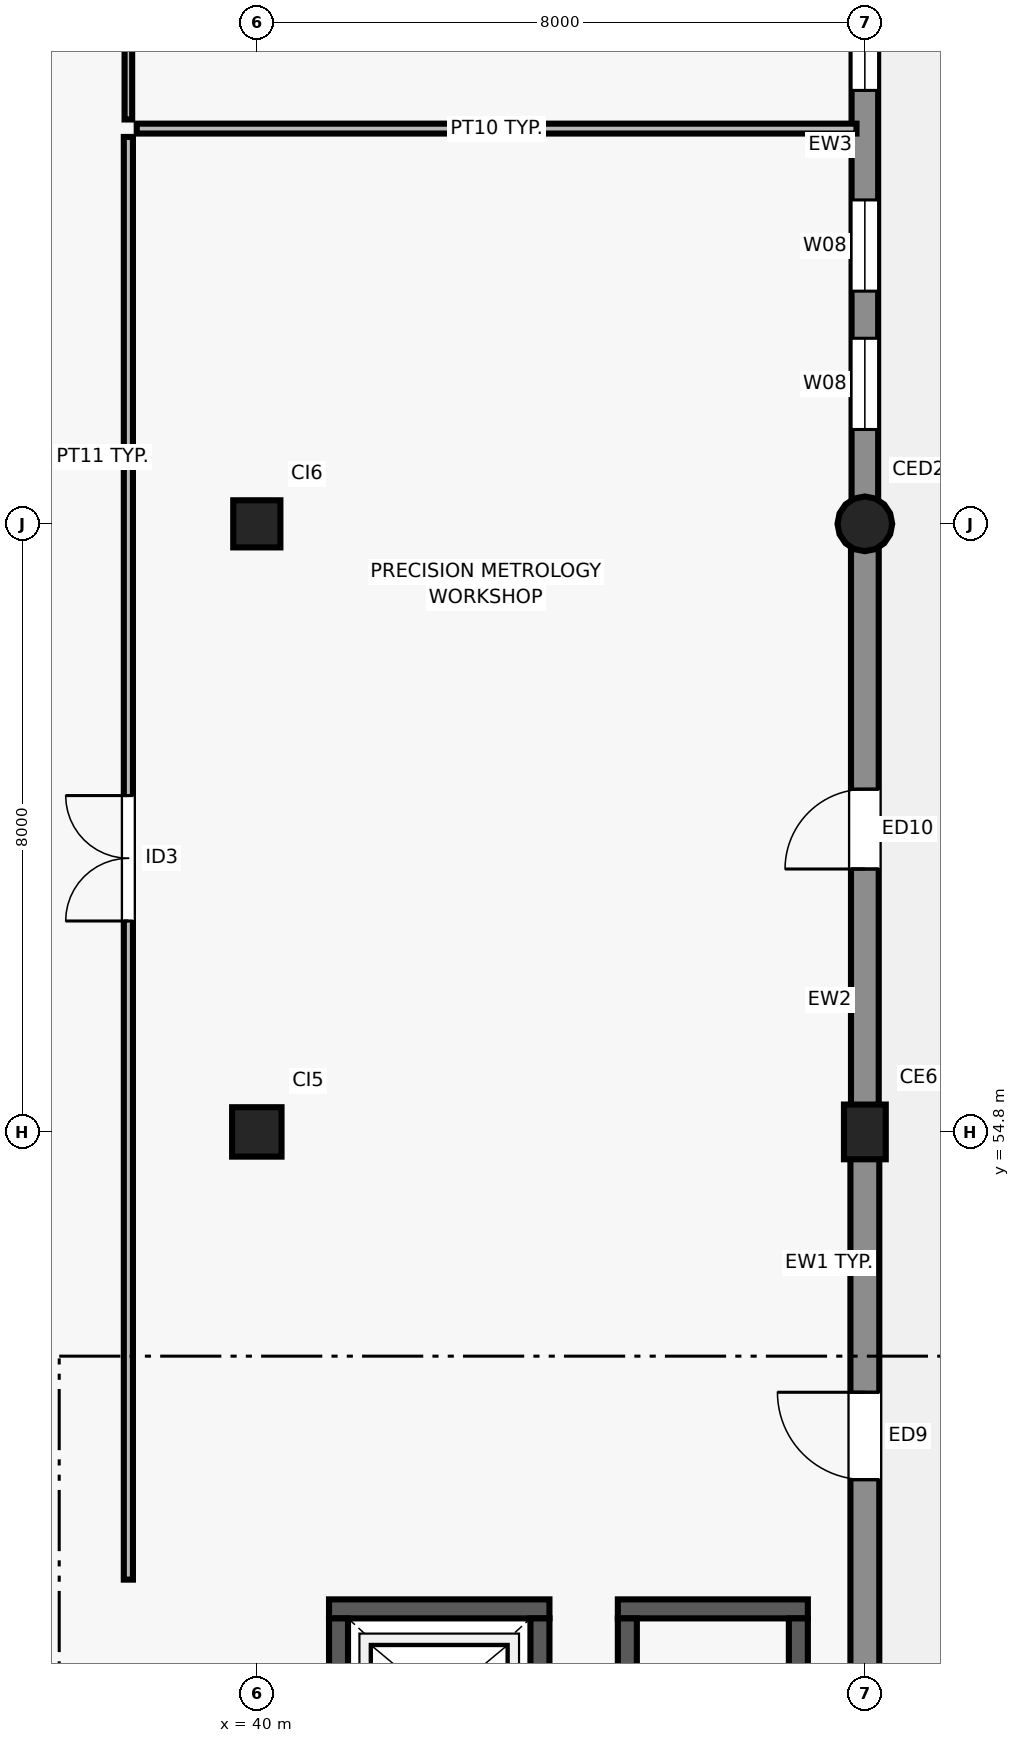
"""IFC4 building model, lengths in metres.
Left out: names, types, materials, properties, quantities, classifications, styles, units other than length and angle.
Written with IfcOpenShell. Run it as: python <this file> out.ifc"""

import sys

from ifc_helpers import new_model, si_unit, direction, frame, frame_2d, origin, origin_2d, place, context, subcontext, project, spatial, rectangle, circle, extrude, element, fill, save


model = new_model("IFC4")
c1 = context("Model", 3, precision=1e-05, world=origin(), true_north=direction((0.0, 1.0)))
c2 = subcontext(c1, "Body", "Model", "MODEL_VIEW")
j1 = project(units=[si_unit("LENGTHUNIT", "METRE"), si_unit("PLANEANGLEUNIT", "RADIAN")], contexts=[c1])
p1 = place(None, origin())
s1 = spatial("IfcSite", under=j1, at=p1, CompositionType="ELEMENT")
p2 = place(p1, origin())
s2 = spatial("IfcBuilding", under=s1, at=p2, CompositionType="ELEMENT")
p3 = place(p2, frame((0.0, 0.0, 4.5)))
s3 = spatial("IfcBuildingStorey", under=s2, at=p3, CompositionType="ELEMENT", Elevation=4.5)
p4 = place(p3, frame((40.0, 54.8, 0.0), z_axis=(0.0, 0.0, 1.0), x_axis=(1.0, 0.0, 0.0)))
e1 = element("IfcColumn", 1, at=p4, inside=s3, PredefinedType="COLUMN", context=c2, shape_type="SweptSolid", body=[
    extrude(rectangle(XDim=0.65, YDim=0.65, at=origin_2d()), origin(), (0.0, 0.0, 1.0), 4.5),
])
p5 = place(p3, frame((40.0, 62.8, 0.0), z_axis=(0.0, 0.0, 1.0), x_axis=(1.0, 0.0, 0.0)))
e2 = element("IfcColumn", 2, at=p5, inside=s3, PredefinedType="COLUMN", context=c2, shape_type="SweptSolid", body=[
    extrude(rectangle(XDim=0.62, YDim=0.62, at=origin_2d()), origin(), (0.0, 0.0, 1.0), 4.5),
])
p6 = place(p3, frame((48.0, 54.8, 0.0), z_axis=(0.0, 0.0, 1.0), x_axis=(1.0, 0.0, 0.0)))
e3 = element("IfcColumn", 3, at=p6, inside=s3, PredefinedType="COLUMN", context=c2, shape_type="SweptSolid", body=[
    extrude(rectangle(XDim=0.72, YDim=0.55, at=origin_2d()), origin(), (0.0, 0.0, 1.0), 4.5),
])
p7 = place(p3, frame((48.0, 62.8, 0.0), z_axis=(0.0, 0.0, 1.0), x_axis=(1.0, 0.0, 0.0)))
e4 = element("IfcColumn", 4, at=p7, inside=s3, PredefinedType="COLUMN", context=c2, shape_type="SweptSolid", body=[
    extrude(circle(Radius=0.36, at=origin_2d()), origin(), (0.0, 0.0, 1.0), 4.5),
])
p8 = place(p3, frame((48.0, 47.07, 0.0), z_axis=(0.0, 0.0, 1.0), x_axis=(0.0, 1.0, 0.0)))
e5 = element("IfcWall", 5, at=p8, inside=s3, PredefinedType="SOLIDWALL", context=c2, shape_type="SweptSolid", body=[
    extrude(rectangle(XDim=7.46, YDim=0.38, at=frame_2d((3.73, 0.0))), origin(), (0.0, 0.0, 1.0), 3.78),
])
p9 = place(p8, frame((3.155, 0.0, 0.0)))
e6 = element("IfcOpeningElement", 6, at=p9, cuts=e5, PredefinedType="OPENING", context=c2, shape_type="SweptSolid", body=[
    extrude(rectangle(XDim=1.15, YDim=2.2, at=frame_2d((0.575, 1.1))), frame((0.0, 0.2, 0.0), z_axis=(0.0, -1.0, 0.0), x_axis=(1.0, 0.0, 0.0)), (0.0, 0.0, 1.0), 0.4),
])
p10 = place(p3, frame((48.0, 55.07, 0.0), z_axis=(0.0, 0.0, 1.0), x_axis=(0.0, 1.0, 0.0)))
e7 = element("IfcWall", 7, at=p10, inside=s3, PredefinedType="SOLIDWALL", context=c2, shape_type="SweptSolid", body=[
    extrude(rectangle(XDim=7.427, YDim=0.365, at=frame_2d((3.714, 0.0))), origin(), (0.0, 0.0, 1.0), 3.6),
])
p11 = place(p10, frame((3.189, 0.0, 0.0)))
e8 = element("IfcOpeningElement", 8, at=p11, cuts=e7, PredefinedType="OPENING", context=c2, shape_type="SweptSolid", body=[
    extrude(rectangle(XDim=1.05, YDim=2.15, at=frame_2d((0.525, 1.075))), frame((0.0, 0.192, 0.0), z_axis=(0.0, -1.0, 0.0), x_axis=(1.0, 0.0, 0.0)), (0.0, 0.0, 1.0), 0.385),
])
p12 = place(p3, frame((48.0, 63.102, 0.0), z_axis=(0.0, 0.0, 1.0), x_axis=(0.0, 1.0, 0.0)))
e9 = element("IfcWall", 9, at=p12, inside=s3, PredefinedType="SOLIDWALL", context=c2, shape_type="SweptSolid", body=[
    extrude(rectangle(XDim=7.403, YDim=0.35, at=frame_2d((3.701, 0.0))), origin(), (0.0, 0.0, 1.0), 3.64),
])
p13 = place(p12, frame((0.939, 0.0, 0.9)))
e10 = element("IfcOpeningElement", 10, at=p13, cuts=e9, PredefinedType="OPENING", context=c2, shape_type="SweptSolid", body=[
    extrude(rectangle(XDim=1.2, YDim=1.8, at=frame_2d((0.6, 0.9))), frame((0.0, 0.185, 0.0), z_axis=(0.0, -1.0, 0.0), x_axis=(1.0, 0.0, 0.0)), (0.0, 0.0, 1.0), 0.37),
])
p14 = place(p12, frame((2.759, 0.0, 0.9)))
e11 = element("IfcOpeningElement", 11, at=p14, cuts=e9, PredefinedType="OPENING", context=c2, shape_type="SweptSolid", body=[
    extrude(rectangle(XDim=1.2, YDim=1.8, at=frame_2d((0.6, 0.9))), frame((0.0, 0.185, 0.0), z_axis=(0.0, -1.0, 0.0), x_axis=(1.0, 0.0, 0.0)), (0.0, 0.0, 1.0), 0.37),
])
p15 = place(p12, frame((5.4, 0.0, 0.9)))
e12 = element("IfcOpeningElement", 12, at=p15, cuts=e9, PredefinedType="OPENING", context=c2, shape_type="SweptSolid", body=[
    extrude(rectangle(XDim=1.5, YDim=1.25, at=frame_2d((0.75, 0.625))), frame((0.0, 0.185, 0.0), z_axis=(0.0, -1.0, 0.0), x_axis=(1.0, 0.0, 0.0)), (0.0, 0.0, 1.0), 0.37),
])
p16 = place(p3, frame((40.95, 48.525, 0.0), z_axis=(0.0, 0.0, 1.0), x_axis=(1.0, 0.0, 0.0)))
e13 = element("IfcWall", 13, at=p16, inside=s3, PredefinedType="SHEAR", context=c2, shape_type="SweptSolid", body=[
    extrude(rectangle(XDim=2.9, YDim=0.25, at=frame_2d((1.45, 0.0))), origin(), (0.0, 0.0, 1.0), 4.22),
])
for number, where, z_axis, x_axis in (
    (14, (41.075, 46.2, 0.0), (0.0, 0.0, 1.0), (0.0, 1.0, 0.0)),
    (15, (43.725, 46.2, 0.0), (0.0, 0.0, 1.0), (0.0, 1.0, 0.0)),
):
    element("IfcWall", number, at=place(p3, frame(where, z_axis=z_axis, x_axis=x_axis)), inside=s3, PredefinedType="SHEAR", context=c2, shape_type="SweptSolid", body=[
        extrude(rectangle(XDim=2.2, YDim=0.25, at=frame_2d((1.1, 0.0))), origin(), (0.0, 0.0, 1.0), 4.22),
    ])
p17 = place(p3, frame((44.75, 48.525, 0.0), z_axis=(0.0, 0.0, 1.0), x_axis=(1.0, 0.0, 0.0)))
e16 = element("IfcWall", 16, at=p17, inside=s3, PredefinedType="SHEAR", context=c2, shape_type="SweptSolid", body=[
    extrude(rectangle(XDim=2.5, YDim=0.25, at=frame_2d((1.25, 0.0))), origin(), (0.0, 0.0, 1.0), 4.22),
])
for number, where, z_axis, x_axis in (
    (17, (44.875, 46.2, 0.0), (0.0, 0.0, 1.0), (0.0, 1.0, 0.0)),
    (18, (47.125, 46.2, 0.0), (0.0, 0.0, 1.0), (0.0, 1.0, 0.0)),
):
    element("IfcWall", number, at=place(p3, frame(where, z_axis=z_axis, x_axis=x_axis)), inside=s3, PredefinedType="SHEAR", context=c2, shape_type="SweptSolid", body=[
        extrude(rectangle(XDim=2.2, YDim=0.25, at=frame_2d((1.1, 0.0))), origin(), (0.0, 0.0, 1.0), 4.22),
    ])
p18 = place(p3, frame((38.42, 68.0, 0.0), z_axis=(0.0, 0.0, 1.0), x_axis=(1.0, 0.0, 0.0)))
e19 = element("IfcWall", 19, at=p18, inside=s3, PredefinedType="PARTITIONING", context=c2, shape_type="SweptSolid", body=[
    extrude(rectangle(XDim=9.47, YDim=0.13, at=frame_2d((4.735, 0.0))), origin(), (0.0, 0.0, 1.0), 4.2),
])
p19 = place(p3, frame((38.31, 48.91, 0.0), z_axis=(0.0, 0.0, 1.0), x_axis=(0.0, 1.0, 0.0)))
e20 = element("IfcWall", 20, at=p19, inside=s3, PredefinedType="PARTITIONING", context=c2, shape_type="SweptSolid", body=[
    extrude(rectangle(XDim=18.98, YDim=0.12, at=frame_2d((9.49, 0.0))), origin(), (0.0, 0.0, 1.0), 4.2),
])
p20 = place(p19, frame((8.665, 0.0, 0.0)))
e21 = element("IfcOpeningElement", 21, at=p20, cuts=e20, PredefinedType="OPENING", context=c2, shape_type="SweptSolid", body=[
    extrude(rectangle(XDim=1.65, YDim=2.3, at=frame_2d((0.825, 1.15))), frame((0.0, 0.07, 0.0), z_axis=(0.0, -1.0, 0.0), x_axis=(1.0, 0.0, 0.0)), (0.0, 0.0, 1.0), 0.14),
])
p21 = place(p3, frame((38.31, 68.12, 0.0), z_axis=(0.0, 0.0, 1.0), x_axis=(0.0, 1.0, 0.0)))
e22 = element("IfcWall", 22, at=p21, inside=s3, PredefinedType="PARTITIONING", context=c2, shape_type="SweptSolid", body=[
    extrude(rectangle(XDim=17.77, YDim=0.1, at=frame_2d((8.885, 0.0))), origin(), (0.0, 0.0, 1.0), 4.2),
])
p22 = place(p21, frame((8.365, 0.0, 0.0)))
e23 = element("IfcOpeningElement", 23, at=p22, cuts=e22, PredefinedType="OPENING", context=c2, shape_type="SweptSolid", body=[
    extrude(rectangle(XDim=1.04, YDim=2.15, at=frame_2d((0.52, 1.075))), frame((0.0, 0.06, 0.0), z_axis=(0.0, -1.0, 0.0), x_axis=(1.0, 0.0, 0.0)), (0.0, 0.0, 1.0), 0.12),
])
p23 = place(p9, frame((1.15, 0.0, 0.0), z_axis=(0.0, 0.0, 1.0), x_axis=(-1.0, 0.0, 0.0)))
e24 = element("IfcDoor", 24, at=p23, inside=s3, OperationType="SINGLE_SWING_RIGHT", PredefinedType="DOOR", context=c2, shape_type="SweptSolid", body=[
    extrude(rectangle(XDim=1.15, YDim=2.2, at=frame_2d((0.575, 1.1))), frame((0.0, 0.025, 0.0), z_axis=(0.0, -1.0, 0.0), x_axis=(1.0, 0.0, 0.0)), (0.0, 0.0, 1.0), 0.05),
])
fill(e6, e24)
p24 = place(p11, frame((1.05, 0.0, 0.0), z_axis=(0.0, 0.0, 1.0), x_axis=(-1.0, 0.0, 0.0)))
e25 = element("IfcDoor", 25, at=p24, inside=s3, OperationType="SINGLE_SWING_LEFT", PredefinedType="DOOR", context=c2, shape_type="SweptSolid", body=[
    extrude(rectangle(XDim=1.05, YDim=2.15, at=frame_2d((0.525, 1.075))), frame((0.0, 0.025, 0.0), z_axis=(0.0, -1.0, 0.0), x_axis=(1.0, 0.0, 0.0)), (0.0, 0.0, 1.0), 0.05),
])
fill(e8, e25)
p25 = place(p13, origin())
e26 = element("IfcWindow", 26, at=p25, inside=s3, PartitioningType="SINGLE_PANEL", PredefinedType="WINDOW", context=c2, shape_type="SweptSolid", body=[
    extrude(rectangle(XDim=1.2, YDim=1.8, at=frame_2d((0.6, 0.9))), frame((0.0, 0.03, 0.0), z_axis=(0.0, -1.0, 0.0), x_axis=(1.0, 0.0, 0.0)), (0.0, 0.0, 1.0), 0.06),
])
fill(e10, e26)
p26 = place(p14, origin())
e27 = element("IfcWindow", 27, at=p26, inside=s3, PartitioningType="SINGLE_PANEL", PredefinedType="WINDOW", context=c2, shape_type="SweptSolid", body=[
    extrude(rectangle(XDim=1.2, YDim=1.8, at=frame_2d((0.6, 0.9))), frame((0.0, 0.03, 0.0), z_axis=(0.0, -1.0, 0.0), x_axis=(1.0, 0.0, 0.0)), (0.0, 0.0, 1.0), 0.06),
])
fill(e11, e27)
p27 = place(p15, origin())
e28 = element("IfcWindow", 28, at=p27, inside=s3, PartitioningType="SINGLE_PANEL", PredefinedType="WINDOW", context=c2, shape_type="SweptSolid", body=[
    extrude(rectangle(XDim=1.5, YDim=1.25, at=frame_2d((0.75, 0.625))), frame((0.0, 0.03, 0.0), z_axis=(0.0, -1.0, 0.0), x_axis=(1.0, 0.0, 0.0)), (0.0, 0.0, 1.0), 0.06),
])
fill(e12, e28)
p28 = place(p20, origin())
e29 = element("IfcDoor", 29, at=p28, inside=s3, OperationType="DOUBLE_DOOR_SINGLE_SWING", PredefinedType="DOOR", context=c2, shape_type="SweptSolid", body=[
    extrude(rectangle(XDim=1.65, YDim=2.3, at=frame_2d((0.825, 1.15))), frame((0.0, 0.025, 0.0), z_axis=(0.0, -1.0, 0.0), x_axis=(1.0, 0.0, 0.0)), (0.0, 0.0, 1.0), 0.05),
])
fill(e21, e29)
save(model, sys.argv[1])
